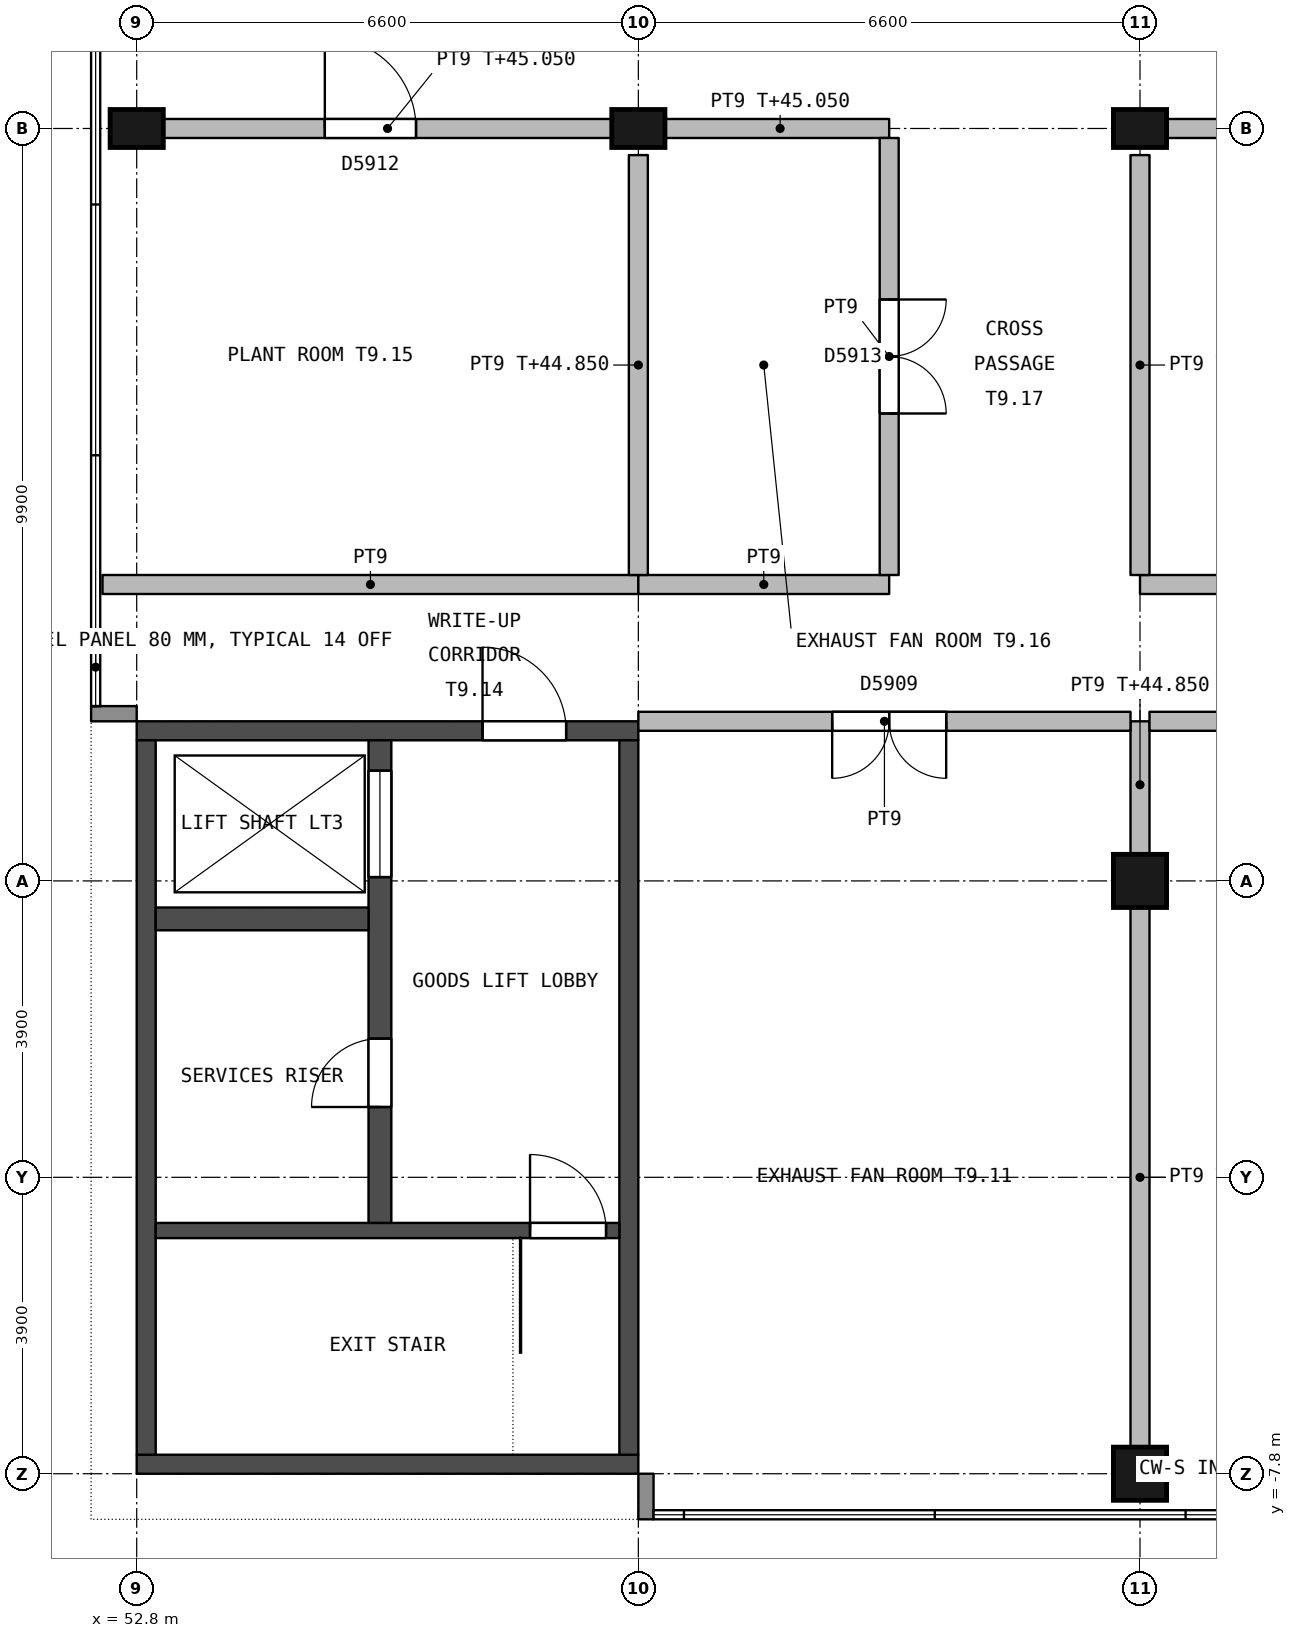
"""IFC4 building model, lengths in metres.
Left out: names, types, materials, properties, quantities, classifications, styles, units other than length and angle.
Written with IfcOpenShell. Run it as: python <this file> out.ifc"""

import sys

from ifc_helpers import new_model, si_unit, direction, frame, frame_2d, origin, origin_2d, place, context, subcontext, project, spatial, rectangle, extrude, element, fill, save


model = new_model("IFC4")
c1 = context("Model", 3, precision=1e-05, world=origin(), true_north=direction((0.0, 1.0)))
c2 = subcontext(c1, "Body", "Model", "MODEL_VIEW")
j1 = project(units=[si_unit("LENGTHUNIT", "METRE"), si_unit("PLANEANGLEUNIT", "RADIAN")], contexts=[c1])
p1 = place(None, origin())
s1 = spatial("IfcSite", under=j1, at=p1, CompositionType="ELEMENT")
p2 = place(p1, origin())
s2 = spatial("IfcBuilding", under=s1, at=p2, CompositionType="ELEMENT")
p3 = place(p2, frame((0.0, 0.0, 41.4)))
s3 = spatial("IfcBuildingStorey", under=s2, at=p3, CompositionType="ELEMENT", Elevation=41.4)
for number, where, z_axis, x_axis in (
    (1, (52.8, 9.9, 0.0), (0.0, 0.0, 1.0), (1.0, 0.0, 0.0)),
    (2, (59.4, 9.9, 0.0), (0.0, 0.0, 1.0), (1.0, 0.0, 0.0)),
):
    element("IfcColumn", number, at=place(p3, frame(where, z_axis=z_axis, x_axis=x_axis)), inside=s3, PredefinedType="COLUMN", context=c2, shape_type="SweptSolid", body=[
        extrude(rectangle(XDim=0.7, YDim=0.5, at=origin_2d()), origin(), (0.0, 0.0, 1.0), 4.25),
    ])
for number, where, z_axis, x_axis in (
    (3, (66.0, -7.8, 0.0), (0.0, 0.0, 1.0), (1.0, 0.0, 0.0)),
    (4, (66.0, 0.0, 0.0), (0.0, 0.0, 1.0), (1.0, 0.0, 0.0)),
):
    element("IfcColumn", number, at=place(p3, frame(where, z_axis=z_axis, x_axis=x_axis)), inside=s3, PredefinedType="COLUMN", context=c2, shape_type="SweptSolid", body=[
        extrude(rectangle(XDim=0.7, YDim=0.7, at=origin_2d()), origin(), (0.0, 0.0, 1.0), 4.25),
    ])
p4 = place(p3, frame((66.0, 9.9, 0.0), z_axis=(0.0, 0.0, 1.0), x_axis=(1.0, 0.0, 0.0)))
e5 = element("IfcColumn", 5, at=p4, inside=s3, PredefinedType="COLUMN", context=c2, shape_type="SweptSolid", body=[
    extrude(rectangle(XDim=0.7, YDim=0.5, at=origin_2d()), origin(), (0.0, 0.0, 1.0), 4.25),
])
p5 = place(p3, frame((59.4, 1.975, 0.0), z_axis=(0.0, 0.0, 1.0), x_axis=(-1.0, 0.0, 0.0)))
e6 = element("IfcWall", 6, at=p5, inside=s3, PredefinedType="SHEAR", context=c2, shape_type="SweptSolid", body=[
    extrude(rectangle(XDim=6.6, YDim=0.25, at=frame_2d((3.3, 0.0))), origin(), (0.0, 0.0, 1.0), 4.25),
])
p6 = place(p5, frame((0.95, 0.0, 0.0)))
e7 = element("IfcOpeningElement", 7, at=p6, cuts=e6, PredefinedType="OPENING", context=c2, shape_type="SweptSolid", body=[
    extrude(rectangle(XDim=1.1, YDim=2.1, at=frame_2d((0.55, 1.05))), frame((0.0, 0.135, 0.0), z_axis=(0.0, -1.0, 0.0), x_axis=(1.0, 0.0, 0.0)), (0.0, 0.0, 1.0), 0.27),
])
p7 = place(p3, frame((59.4, -7.675, 0.0), z_axis=(0.0, 0.0, 1.0), x_axis=(-1.0, 0.0, 0.0)))
e8 = element("IfcWall", 8, at=p7, inside=s3, PredefinedType="SHEAR", context=c2, shape_type="SweptSolid", body=[
    extrude(rectangle(XDim=6.6, YDim=0.25, at=frame_2d((3.3, 0.0))), origin(), (0.0, 0.0, 1.0), 4.25),
])
for number, where, z_axis, x_axis in (
    (9, (59.275, 1.85, 0.0), (0.0, 0.0, 1.0), (0.0, -1.0, 0.0)),
    (10, (52.925, 1.85, 0.0), (0.0, 0.0, 1.0), (0.0, -1.0, 0.0)),
):
    element("IfcWall", number, at=place(p3, frame(where, z_axis=z_axis, x_axis=x_axis)), inside=s3, PredefinedType="SHEAR", context=c2, shape_type="SweptSolid", body=[
        extrude(rectangle(XDim=9.4, YDim=0.25, at=frame_2d((4.7, 0.0))), origin(), (0.0, 0.0, 1.0), 4.25),
    ])
p8 = place(p3, frame((59.15, -4.6, 0.0), z_axis=(0.0, 0.0, 1.0), x_axis=(-1.0, 0.0, 0.0)))
e11 = element("IfcWall", 11, at=p8, inside=s3, PredefinedType="SHEAR", context=c2, shape_type="SweptSolid", body=[
    extrude(rectangle(XDim=6.1, YDim=0.2, at=frame_2d((3.05, 0.0))), origin(), (0.0, 0.0, 1.0), 4.25),
])
p9 = place(p8, frame((0.175, 0.0, 0.0)))
e12 = element("IfcOpeningElement", 12, at=p9, cuts=e11, PredefinedType="OPENING", context=c2, shape_type="SweptSolid", body=[
    extrude(rectangle(XDim=1.0, YDim=2.1, at=frame_2d((0.5, 1.05))), frame((0.0, 0.11, 0.0), z_axis=(0.0, -1.0, 0.0), x_axis=(1.0, 0.0, 0.0)), (0.0, 0.0, 1.0), 0.22),
])
p10 = place(p3, frame((56.0, 1.85, 0.0), z_axis=(0.0, 0.0, 1.0), x_axis=(0.0, -1.0, 0.0)))
e13 = element("IfcWall", 13, at=p10, inside=s3, PredefinedType="SHEAR", context=c2, shape_type="SweptSolid", body=[
    extrude(rectangle(XDim=6.35, YDim=0.3, at=frame_2d((3.175, 0.0))), origin(), (0.0, 0.0, 1.0), 4.25),
])
p11 = place(p10, frame((3.925, 0.0, 0.0)))
e14 = element("IfcOpeningElement", 14, at=p11, cuts=e13, PredefinedType="OPENING", context=c2, shape_type="SweptSolid", body=[
    extrude(rectangle(XDim=0.9, YDim=2.1, at=frame_2d((0.45, 1.05))), frame((0.0, 0.16, 0.0), z_axis=(0.0, -1.0, 0.0), x_axis=(1.0, 0.0, 0.0)), (0.0, 0.0, 1.0), 0.32),
])
p12 = place(p10, frame((0.4, 0.0, 0.0)))
e15 = element("IfcOpeningElement", 15, at=p12, cuts=e13, PredefinedType="OPENING", context=c2, shape_type="SweptSolid", body=[
    extrude(rectangle(XDim=1.4, YDim=2.4, at=frame_2d((0.7, 1.2))), frame((0.0, 0.16, 0.0), z_axis=(0.0, -1.0, 0.0), x_axis=(1.0, 0.0, 0.0)), (0.0, 0.0, 1.0), 0.32),
])
p13 = place(p3, frame((55.85, -0.5, 0.0), z_axis=(0.0, 0.0, 1.0), x_axis=(-1.0, 0.0, 0.0)))
e16 = element("IfcWall", 16, at=p13, inside=s3, PredefinedType="SHEAR", context=c2, shape_type="SweptSolid", body=[
    extrude(rectangle(XDim=2.8, YDim=0.3, at=frame_2d((1.4, 0.0))), origin(), (0.0, 0.0, 1.0), 4.25),
])
p14 = place(p3, frame((59.5, -7.8, 0.0), z_axis=(0.0, 0.0, 1.0), x_axis=(0.0, -1.0, 0.0)))
e17 = element("IfcWall", 17, at=p14, inside=s3, PredefinedType="STANDARD", context=c2, shape_type="SweptSolid", body=[
    extrude(rectangle(XDim=0.6, YDim=0.2, at=frame_2d((0.3, 0.0))), origin(), (0.0, 0.0, 1.0), 3.65),
])
p15 = place(p3, frame((52.8, 2.2, 0.0), z_axis=(0.0, 0.0, 1.0), x_axis=(-1.0, 0.0, 0.0)))
e18 = element("IfcWall", 18, at=p15, inside=s3, PredefinedType="STANDARD", context=c2, shape_type="SweptSolid", body=[
    extrude(rectangle(XDim=0.6, YDim=0.2, at=frame_2d((0.3, 0.0))), origin(), (0.0, 0.0, 1.0), 3.65),
])
p16 = place(p3, frame((53.15, 9.9, 0.0), z_axis=(0.0, 0.0, 1.0), x_axis=(1.0, 0.0, 0.0)))
e19 = element("IfcWall", 19, at=p16, inside=s3, PredefinedType="PARTITIONING", context=c2, shape_type="SweptSolid", body=[
    extrude(rectangle(XDim=5.9, YDim=0.25, at=frame_2d((2.95, 0.0))), origin(), (0.0, 0.0, 1.0), 3.65),
])
p17 = place(p16, frame((2.125, 0.0, 0.0)))
e20 = element("IfcOpeningElement", 20, at=p17, cuts=e19, PredefinedType="OPENING", context=c2, shape_type="SweptSolid", body=[
    extrude(rectangle(XDim=1.2, YDim=2.4, at=frame_2d((0.6, 1.2))), frame((0.0, 0.135, 0.0), z_axis=(0.0, -1.0, 0.0), x_axis=(1.0, 0.0, 0.0)), (0.0, 0.0, 1.0), 0.27),
])
p18 = place(p3, frame((59.75, 9.9, 0.0), z_axis=(0.0, 0.0, 1.0), x_axis=(1.0, 0.0, 0.0)))
e21 = element("IfcWall", 21, at=p18, inside=s3, PredefinedType="PARTITIONING", context=c2, shape_type="SweptSolid", body=[
    extrude(rectangle(XDim=2.95, YDim=0.25, at=frame_2d((1.475, 0.0))), origin(), (0.0, 0.0, 1.0), 3.65),
])
p19 = place(p3, frame((66.35, 9.9, 0.0), z_axis=(0.0, 0.0, 1.0), x_axis=(1.0, 0.0, 0.0)))
e22 = element("IfcWall", 22, at=p19, inside=s3, PredefinedType="PARTITIONING", context=c2, shape_type="SweptSolid", body=[
    extrude(rectangle(XDim=5.9, YDim=0.25, at=frame_2d((2.95, 0.0))), origin(), (0.0, 0.0, 1.0), 3.65),
])
p20 = place(p19, frame((2.2, 0.0, 0.0)))
e23 = element("IfcOpeningElement", 23, at=p20, cuts=e22, PredefinedType="OPENING", context=c2, shape_type="SweptSolid", body=[
    extrude(rectangle(XDim=1.5, YDim=2.4, at=frame_2d((0.75, 1.2))), frame((0.0, 0.135, 0.0), z_axis=(0.0, -1.0, 0.0), x_axis=(1.0, 0.0, 0.0)), (0.0, 0.0, 1.0), 0.27),
])
p21 = place(p3, frame((66.0, -7.45, 0.0), z_axis=(0.0, 0.0, 1.0), x_axis=(0.0, 1.0, 0.0)))
e24 = element("IfcWall", 24, at=p21, inside=s3, PredefinedType="PARTITIONING", context=c2, shape_type="SweptSolid", body=[
    extrude(rectangle(XDim=7.1, YDim=0.25, at=frame_2d((3.55, 0.0))), origin(), (0.0, 0.0, 1.0), 3.55),
])
p22 = place(p3, frame((66.0, 0.35, 0.0), z_axis=(0.0, 0.0, 1.0), x_axis=(0.0, 1.0, 0.0)))
e25 = element("IfcWall", 25, at=p22, inside=s3, PredefinedType="PARTITIONING", context=c2, shape_type="SweptSolid", body=[
    extrude(rectangle(XDim=1.75, YDim=0.25, at=frame_2d((0.875, 0.0))), origin(), (0.0, 0.0, 1.0), 3.45),
])
p23 = place(p3, frame((65.875, 2.1, 0.0), z_axis=(0.0, 0.0, 1.0), x_axis=(-1.0, 0.0, 0.0)))
e26 = element("IfcWall", 26, at=p23, inside=s3, PredefinedType="PARTITIONING", context=c2, shape_type="SweptSolid", body=[
    extrude(rectangle(XDim=6.475, YDim=0.25, at=frame_2d((3.237, 0.0))), origin(), (0.0, 0.0, 1.0), 4.25),
])
p24 = place(p23, frame((2.425, 0.0, 0.0)))
e27 = element("IfcOpeningElement", 27, at=p24, cuts=e26, PredefinedType="OPENING", context=c2, shape_type="SweptSolid", body=[
    extrude(rectangle(XDim=1.5, YDim=2.4, at=frame_2d((0.75, 1.2))), frame((0.0, 0.135, 0.0), z_axis=(0.0, -1.0, 0.0), x_axis=(1.0, 0.0, 0.0)), (0.0, 0.0, 1.0), 0.27),
])
p25 = place(p3, frame((72.475, 2.1, 0.0), z_axis=(0.0, 0.0, 1.0), x_axis=(-1.0, 0.0, 0.0)))
e28 = element("IfcWall", 28, at=p25, inside=s3, PredefinedType="PARTITIONING", context=c2, shape_type="SweptSolid", body=[
    extrude(rectangle(XDim=6.35, YDim=0.25, at=frame_2d((3.175, 0.0))), origin(), (0.0, 0.0, 1.0), 4.25),
])
p26 = place(p25, frame((2.575, 0.0, 0.0)))
e29 = element("IfcOpeningElement", 29, at=p26, cuts=e28, PredefinedType="OPENING", context=c2, shape_type="SweptSolid", body=[
    extrude(rectangle(XDim=1.2, YDim=2.4, at=frame_2d((0.6, 1.2))), frame((0.0, 0.135, 0.0), z_axis=(0.0, -1.0, 0.0), x_axis=(1.0, 0.0, 0.0)), (0.0, 0.0, 1.0), 0.27),
])
p27 = place(p3, frame((59.4, 3.9, 0.0), z_axis=(0.0, 0.0, 1.0), x_axis=(-1.0, 0.0, 0.0)))
e30 = element("IfcWall", 30, at=p27, inside=s3, PredefinedType="PARTITIONING", context=c2, shape_type="SweptSolid", body=[
    extrude(rectangle(XDim=7.05, YDim=0.25, at=frame_2d((3.525, 0.0))), origin(), (0.0, 0.0, 1.0), 4.25),
])
p28 = place(p3, frame((62.7, 3.9, 0.0), z_axis=(0.0, 0.0, 1.0), x_axis=(-1.0, 0.0, 0.0)))
e31 = element("IfcWall", 31, at=p28, inside=s3, PredefinedType="PARTITIONING", context=c2, shape_type="SweptSolid", body=[
    extrude(rectangle(XDim=3.3, YDim=0.25, at=frame_2d((1.65, 0.0))), origin(), (0.0, 0.0, 1.0), 4.25),
])
p29 = place(p3, frame((72.6, 3.9, 0.0), z_axis=(0.0, 0.0, 1.0), x_axis=(-1.0, 0.0, 0.0)))
e32 = element("IfcWall", 32, at=p29, inside=s3, PredefinedType="PARTITIONING", context=c2, shape_type="SweptSolid", body=[
    extrude(rectangle(XDim=6.6, YDim=0.25, at=frame_2d((3.3, 0.0))), origin(), (0.0, 0.0, 1.0), 4.25),
])
p30 = place(p3, frame((59.4, 4.025, 0.0), z_axis=(0.0, 0.0, 1.0), x_axis=(0.0, 1.0, 0.0)))
e33 = element("IfcWall", 33, at=p30, inside=s3, PredefinedType="PARTITIONING", context=c2, shape_type="SweptSolid", body=[
    extrude(rectangle(XDim=5.525, YDim=0.25, at=frame_2d((2.763, 0.0))), origin(), (0.0, 0.0, 1.0), 3.45),
])
p31 = place(p3, frame((62.7, 9.775, 0.0), z_axis=(0.0, 0.0, 1.0), x_axis=(0.0, -1.0, 0.0)))
e34 = element("IfcWall", 34, at=p31, inside=s3, PredefinedType="PARTITIONING", context=c2, shape_type="SweptSolid", body=[
    extrude(rectangle(XDim=5.75, YDim=0.25, at=frame_2d((2.875, 0.0))), origin(), (0.0, 0.0, 1.0), 4.25),
])
p32 = place(p31, frame((2.125, 0.0, 0.0)))
e35 = element("IfcOpeningElement", 35, at=p32, cuts=e34, PredefinedType="OPENING", context=c2, shape_type="SweptSolid", body=[
    extrude(rectangle(XDim=1.5, YDim=2.4, at=frame_2d((0.75, 1.2))), frame((0.0, 0.135, 0.0), z_axis=(0.0, -1.0, 0.0), x_axis=(1.0, 0.0, 0.0)), (0.0, 0.0, 1.0), 0.27),
])
p33 = place(p3, frame((66.0, 4.025, 0.0), z_axis=(0.0, 0.0, 1.0), x_axis=(0.0, 1.0, 0.0)))
e36 = element("IfcWall", 36, at=p33, inside=s3, PredefinedType="PARTITIONING", context=c2, shape_type="SweptSolid", body=[
    extrude(rectangle(XDim=5.525, YDim=0.25, at=frame_2d((2.763, 0.0))), origin(), (0.0, 0.0, 1.0), 3.45),
])
p34 = place(p11, origin())
e37 = element("IfcDoor", 37, at=p34, inside=s3, OperationType="SINGLE_SWING_RIGHT", PredefinedType="DOOR", context=c2, shape_type="SweptSolid", body=[
    extrude(rectangle(XDim=0.9, YDim=2.1, at=frame_2d((0.45, 1.05))), frame((0.0, 0.025, 0.0), z_axis=(0.0, -1.0, 0.0), x_axis=(1.0, 0.0, 0.0)), (0.0, 0.0, 1.0), 0.05),
])
fill(e14, e37)
p35 = place(p6, origin())
e38 = element("IfcDoor", 38, at=p35, inside=s3, OperationType="SINGLE_SWING_RIGHT", PredefinedType="DOOR", context=c2, shape_type="SweptSolid", body=[
    extrude(rectangle(XDim=1.1, YDim=2.1, at=frame_2d((0.55, 1.05))), frame((0.0, 0.025, 0.0), z_axis=(0.0, -1.0, 0.0), x_axis=(1.0, 0.0, 0.0)), (0.0, 0.0, 1.0), 0.05),
])
fill(e7, e38)
p36 = place(p9, origin())
e39 = element("IfcDoor", 39, at=p36, inside=s3, OperationType="SINGLE_SWING_RIGHT", PredefinedType="DOOR", context=c2, shape_type="SweptSolid", body=[
    extrude(rectangle(XDim=1.0, YDim=2.1, at=frame_2d((0.5, 1.05))), frame((0.0, 0.025, 0.0), z_axis=(0.0, -1.0, 0.0), x_axis=(1.0, 0.0, 0.0)), (0.0, 0.0, 1.0), 0.05),
])
fill(e12, e39)
p37 = place(p12, origin())
e40 = element("IfcDoor", 40, at=p37, inside=s3, OperationType="DOUBLE_DOOR_SLIDING", PredefinedType="NOTDEFINED", context=c2, shape_type="SweptSolid", body=[
    extrude(rectangle(XDim=1.4, YDim=2.4, at=frame_2d((0.7, 1.2))), frame((0.0, 0.025, 0.0), z_axis=(0.0, -1.0, 0.0), x_axis=(1.0, 0.0, 0.0)), (0.0, 0.0, 1.0), 0.05),
])
fill(e15, e40)
p38 = place(p24, origin())
e41 = element("IfcDoor", 41, at=p38, inside=s3, OperationType="DOUBLE_DOOR_SINGLE_SWING", PredefinedType="DOOR", context=c2, shape_type="SweptSolid", body=[
    extrude(rectangle(XDim=1.5, YDim=2.4, at=frame_2d((0.75, 1.2))), frame((0.0, 0.03, 0.0), z_axis=(0.0, -1.0, 0.0), x_axis=(1.0, 0.0, 0.0)), (0.0, 0.0, 1.0), 0.06),
])
fill(e27, e41)
p39 = place(p17, origin())
e42 = element("IfcDoor", 42, at=p39, inside=s3, OperationType="SINGLE_SWING_LEFT", PredefinedType="DOOR", context=c2, shape_type="SweptSolid", body=[
    extrude(rectangle(XDim=1.2, YDim=2.4, at=frame_2d((0.6, 1.2))), frame((0.0, 0.03, 0.0), z_axis=(0.0, -1.0, 0.0), x_axis=(1.0, 0.0, 0.0)), (0.0, 0.0, 1.0), 0.06),
])
fill(e20, e42)
p40 = place(p32, origin())
e43 = element("IfcDoor", 43, at=p40, inside=s3, OperationType="DOUBLE_DOOR_SINGLE_SWING", PredefinedType="DOOR", context=c2, shape_type="SweptSolid", body=[
    extrude(rectangle(XDim=1.5, YDim=2.4, at=frame_2d((0.75, 1.2))), frame((0.0, 0.03, 0.0), z_axis=(0.0, -1.0, 0.0), x_axis=(1.0, 0.0, 0.0)), (0.0, 0.0, 1.0), 0.06),
])
fill(e35, e43)
save(model, sys.argv[1])
